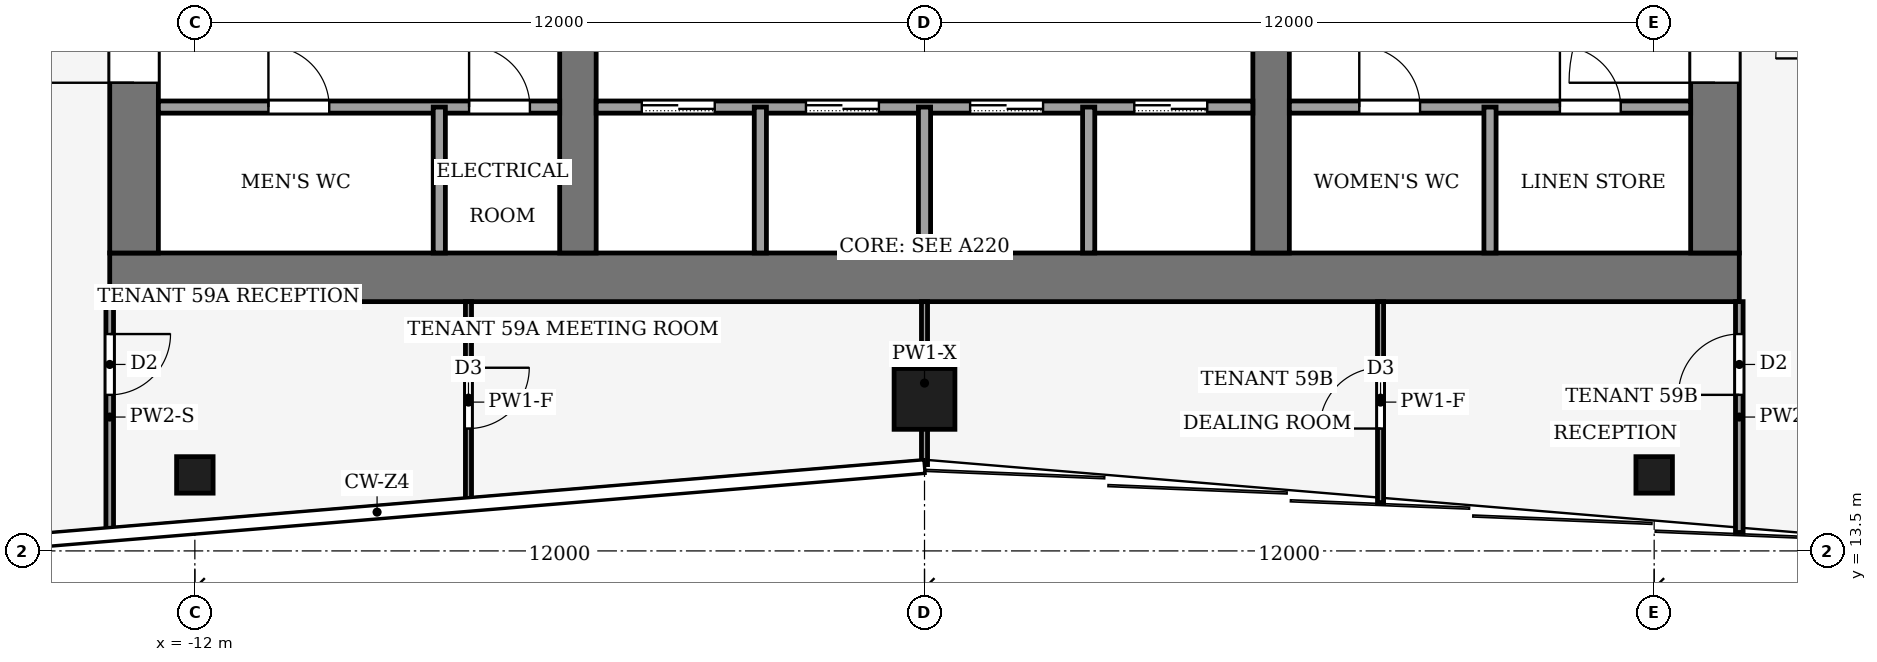
"""IFC4 building model, lengths in metres.
Left out: names, types, materials, properties, quantities, classifications, styles, units other than length and angle.
Written with IfcOpenShell. Run it as: python <this file> out.ifc"""

import sys

from ifc_helpers import new_model, si_unit, direction, frame, frame_2d, origin, origin_2d, place, context, subcontext, project, spatial, rectangle, hollow_rectangle, extrude, element, fill, save


model = new_model("IFC4")
c1 = context("Model", 3, precision=1e-05, world=origin(), true_north=direction((0.0, 1.0)))
c2 = subcontext(c1, "Body", "Model", "MODEL_VIEW")
j1 = project(units=[si_unit("LENGTHUNIT", "METRE"), si_unit("PLANEANGLEUNIT", "RADIAN")], contexts=[c1])
p1 = place(None, origin())
s1 = spatial("IfcSite", under=j1, at=p1, CompositionType="ELEMENT")
p2 = place(p1, origin())
s2 = spatial("IfcBuilding", under=s1, at=p2, CompositionType="ELEMENT")
p3 = place(p2, frame((0.0, 0.0, 258.0)))
s3 = spatial("IfcBuildingStorey", under=s2, at=p3, CompositionType="ELEMENT", Elevation=258.0)
p4 = place(p3, frame((-13.4, 18.0, -0.13), z_axis=(0.0, 0.0, 1.0), x_axis=(1.0, 0.0, 0.0)))
e1 = element("IfcWall", 1, at=p4, inside=s3, PredefinedType="SHEAR", context=c2, shape_type="SweptSolid", body=[
    extrude(rectangle(XDim=26.8, YDim=0.8, at=frame_2d((13.4, 0.0))), origin(), (0.0, 0.0, 1.0), 4.0),
])
p5 = place(p3, frame((-13.0, 18.4, -0.13), z_axis=(0.0, 0.0, 1.0), x_axis=(0.0, 1.0, 0.0)))
e2 = element("IfcWall", 2, at=p5, inside=s3, PredefinedType="SHEAR", context=c2, shape_type="SweptSolid", body=[
    extrude(rectangle(XDim=19.2, YDim=0.8, at=frame_2d((9.6, 0.0))), origin(), (0.0, 0.0, 1.0), 4.0),
])
p6 = place(p5, frame((2.8, 0.0, 0.13)))
e3 = element("IfcOpeningElement", 3, at=p6, cuts=e2, PredefinedType="OPENING", context=c2, shape_type="SweptSolid", body=[
    extrude(rectangle(XDim=2.4, YDim=2.4, at=frame_2d((1.2, 1.2))), frame((0.0, 0.41, 0.0), z_axis=(0.0, -1.0, 0.0), x_axis=(1.0, 0.0, 0.0)), (0.0, 0.0, 1.0), 0.82),
])
p7 = place(p5, frame((13.4, 0.0, 0.13)))
e4 = element("IfcOpeningElement", 4, at=p7, cuts=e2, PredefinedType="OPENING", context=c2, shape_type="SweptSolid", body=[
    extrude(rectangle(XDim=1.4, YDim=2.2, at=frame_2d((0.7, 1.1))), frame((0.0, 0.41, 0.0), z_axis=(0.0, -1.0, 0.0), x_axis=(1.0, 0.0, 0.0)), (0.0, 0.0, 1.0), 0.82),
])
p8 = place(p3, frame((13.0, 18.4, -0.13), z_axis=(0.0, 0.0, 1.0), x_axis=(0.0, 1.0, 0.0)))
e5 = element("IfcWall", 5, at=p8, inside=s3, PredefinedType="SHEAR", context=c2, shape_type="SweptSolid", body=[
    extrude(rectangle(XDim=19.2, YDim=0.8, at=frame_2d((9.6, 0.0))), origin(), (0.0, 0.0, 1.0), 4.0),
])
p9 = place(p8, frame((2.8, 0.0, 0.13)))
e6 = element("IfcOpeningElement", 6, at=p9, cuts=e5, PredefinedType="OPENING", context=c2, shape_type="SweptSolid", body=[
    extrude(rectangle(XDim=2.4, YDim=2.4, at=frame_2d((1.2, 1.2))), frame((0.0, 0.41, 0.0), z_axis=(0.0, -1.0, 0.0), x_axis=(1.0, 0.0, 0.0)), (0.0, 0.0, 1.0), 0.82),
])
p10 = place(p8, frame((13.3, 0.0, 0.13)))
e7 = element("IfcOpeningElement", 7, at=p10, cuts=e5, PredefinedType="OPENING", context=c2, shape_type="SweptSolid", body=[
    extrude(rectangle(XDim=2.4, YDim=2.4, at=frame_2d((1.2, 1.2))), frame((0.0, 0.41, 0.0), z_axis=(0.0, -1.0, 0.0), x_axis=(1.0, 0.0, 0.0)), (0.0, 0.0, 1.0), 0.82),
])
p11 = place(p3, frame((-5.7, 18.4, -0.13), z_axis=(0.0, 0.0, 1.0), x_axis=(0.0, 1.0, 0.0)))
e8 = element("IfcWall", 8, at=p11, inside=s3, PredefinedType="SHEAR", context=c2, shape_type="SweptSolid", body=[
    extrude(rectangle(XDim=19.2, YDim=0.6, at=frame_2d((9.6, 0.0))), origin(), (0.0, 0.0, 1.0), 4.0),
])
p12 = place(p11, frame((8.35, 0.0, 0.13)))
e9 = element("IfcOpeningElement", 9, at=p12, cuts=e8, PredefinedType="OPENING", context=c2, shape_type="SweptSolid", body=[
    extrude(rectangle(XDim=0.9, YDim=2.1, at=frame_2d((0.45, 1.05))), frame((0.0, 0.31, 0.0), z_axis=(0.0, -1.0, 0.0), x_axis=(1.0, 0.0, 0.0)), (0.0, 0.0, 1.0), 0.62),
])
p13 = place(p3, frame((5.7, 18.4, -0.13), z_axis=(0.0, 0.0, 1.0), x_axis=(0.0, 1.0, 0.0)))
e10 = element("IfcWall", 10, at=p13, inside=s3, PredefinedType="SHEAR", context=c2, shape_type="SweptSolid", body=[
    extrude(rectangle(XDim=19.2, YDim=0.6, at=frame_2d((9.6, 0.0))), origin(), (0.0, 0.0, 1.0), 4.0),
])
p14 = place(p13, frame((8.35, 0.0, 0.13)))
e11 = element("IfcOpeningElement", 11, at=p14, cuts=e10, PredefinedType="OPENING", context=c2, shape_type="SweptSolid", body=[
    extrude(rectangle(XDim=0.9, YDim=2.1, at=frame_2d((0.45, 1.05))), frame((0.0, 0.31, 0.0), z_axis=(0.0, -1.0, 0.0), x_axis=(1.0, 0.0, 0.0)), (0.0, 0.0, 1.0), 0.62),
])
p15 = place(p13, frame((13.3, 0.0, 0.13)))
e12 = element("IfcOpeningElement", 12, at=p15, cuts=e10, PredefinedType="OPENING", context=c2, shape_type="SweptSolid", body=[
    extrude(rectangle(XDim=2.4, YDim=2.4, at=frame_2d((1.2, 1.2))), frame((0.0, 0.31, 0.0), z_axis=(0.0, -1.0, 0.0), x_axis=(1.0, 0.0, 0.0)), (0.0, 0.0, 1.0), 0.62),
])
p16 = place(p3, frame((0.0, 16.0, 0.0), z_axis=(0.0, 0.0, 1.0), x_axis=(1.0, 0.0, 0.0)))
e13 = element("IfcColumn", 13, at=p16, inside=s3, PredefinedType="COLUMN", context=c2, shape_type="SweptSolid", body=[
    extrude(hollow_rectangle(XDim=1.0, YDim=1.0, WallThickness=0.045, at=origin_2d()), origin(), (0.0, 0.0, 1.0), 4.0),
])
for number, where, z_axis, x_axis in (
    (14, (-12.0, 14.75, 0.0), (0.0, 0.0, 1.0), (1.0, 0.0, 0.0)),
    (15, (12.0, 14.75, 0.0), (0.0, 0.0, 1.0), (1.0, 0.0, 0.0)),
):
    element("IfcColumn", number, at=place(p3, frame(where, z_axis=z_axis, x_axis=x_axis)), inside=s3, PredefinedType="COLUMN", context=c2, shape_type="SweptSolid", body=[
        extrude(hollow_rectangle(XDim=0.6, YDim=0.6, WallThickness=0.025, at=origin_2d()), origin(), (0.0, 0.0, 1.0), 4.0),
    ])
p17 = place(p3, frame((-12.6, 20.8, 0.0), z_axis=(0.0, 0.0, 1.0), x_axis=(1.0, 0.0, 0.0)))
e16 = element("IfcWall", 16, at=p17, inside=s3, PredefinedType="PARTITIONING", context=c2, shape_type="SweptSolid", body=[
    extrude(rectangle(XDim=6.6, YDim=0.2, at=frame_2d((3.3, 0.0))), origin(), (0.0, 0.0, 1.0), 3.87),
])
p18 = place(p17, frame((1.81, 0.0, 0.0)))
e17 = element("IfcOpeningElement", 17, at=p18, cuts=e16, PredefinedType="OPENING", context=c2, shape_type="SweptSolid", body=[
    extrude(rectangle(XDim=1.0, YDim=2.1, at=frame_2d((0.5, 1.05))), frame((0.0, 0.11, 0.0), z_axis=(0.0, -1.0, 0.0), x_axis=(1.0, 0.0, 0.0)), (0.0, 0.0, 1.0), 0.22),
])
p19 = place(p17, frame((5.11, 0.0, 0.0)))
e18 = element("IfcOpeningElement", 18, at=p19, cuts=e16, PredefinedType="OPENING", context=c2, shape_type="SweptSolid", body=[
    extrude(rectangle(XDim=1.0, YDim=2.1, at=frame_2d((0.5, 1.05))), frame((0.0, 0.11, 0.0), z_axis=(0.0, -1.0, 0.0), x_axis=(1.0, 0.0, 0.0)), (0.0, 0.0, 1.0), 0.22),
])
p20 = place(p3, frame((-5.4, 20.8, 0.0), z_axis=(0.0, 0.0, 1.0), x_axis=(1.0, 0.0, 0.0)))
e19 = element("IfcWall", 19, at=p20, inside=s3, PredefinedType="PARTITIONING", context=c2, shape_type="SweptSolid", body=[
    extrude(rectangle(XDim=10.8, YDim=0.2, at=frame_2d((5.4, 0.0))), origin(), (0.0, 0.0, 1.0), 3.87),
])
p21 = place(p20, frame((0.75, 0.0, 0.0)))
e20 = element("IfcOpeningElement", 20, at=p21, cuts=e19, PredefinedType="OPENING", context=c2, shape_type="SweptSolid", body=[
    extrude(rectangle(XDim=1.2, YDim=2.2, at=frame_2d((0.6, 1.1))), frame((0.0, 0.11, 0.0), z_axis=(0.0, -1.0, 0.0), x_axis=(1.0, 0.0, 0.0)), (0.0, 0.0, 1.0), 0.22),
])
p22 = place(p20, frame((3.45, 0.0, 0.0)))
e21 = element("IfcOpeningElement", 21, at=p22, cuts=e19, PredefinedType="OPENING", context=c2, shape_type="SweptSolid", body=[
    extrude(rectangle(XDim=1.2, YDim=2.2, at=frame_2d((0.6, 1.1))), frame((0.0, 0.11, 0.0), z_axis=(0.0, -1.0, 0.0), x_axis=(1.0, 0.0, 0.0)), (0.0, 0.0, 1.0), 0.22),
])
p23 = place(p20, frame((6.15, 0.0, 0.0)))
e22 = element("IfcOpeningElement", 22, at=p23, cuts=e19, PredefinedType="OPENING", context=c2, shape_type="SweptSolid", body=[
    extrude(rectangle(XDim=1.2, YDim=2.2, at=frame_2d((0.6, 1.1))), frame((0.0, 0.11, 0.0), z_axis=(0.0, -1.0, 0.0), x_axis=(1.0, 0.0, 0.0)), (0.0, 0.0, 1.0), 0.22),
])
p24 = place(p20, frame((8.85, 0.0, 0.0)))
e23 = element("IfcOpeningElement", 23, at=p24, cuts=e19, PredefinedType="OPENING", context=c2, shape_type="SweptSolid", body=[
    extrude(rectangle(XDim=1.2, YDim=2.2, at=frame_2d((0.6, 1.1))), frame((0.0, 0.11, 0.0), z_axis=(0.0, -1.0, 0.0), x_axis=(1.0, 0.0, 0.0)), (0.0, 0.0, 1.0), 0.22),
])
p25 = place(p3, frame((6.0, 20.8, 0.0), z_axis=(0.0, 0.0, 1.0), x_axis=(1.0, 0.0, 0.0)))
e24 = element("IfcWall", 24, at=p25, inside=s3, PredefinedType="PARTITIONING", context=c2, shape_type="SweptSolid", body=[
    extrude(rectangle(XDim=6.6, YDim=0.2, at=frame_2d((3.3, 0.0))), origin(), (0.0, 0.0, 1.0), 3.87),
])
p26 = place(p25, frame((1.15, 0.0, 0.0)))
e25 = element("IfcOpeningElement", 25, at=p26, cuts=e24, PredefinedType="OPENING", context=c2, shape_type="SweptSolid", body=[
    extrude(rectangle(XDim=1.0, YDim=2.1, at=frame_2d((0.5, 1.05))), frame((0.0, 0.11, 0.0), z_axis=(0.0, -1.0, 0.0), x_axis=(1.0, 0.0, 0.0)), (0.0, 0.0, 1.0), 0.22),
])
p27 = place(p25, frame((4.45, 0.0, 0.0)))
e26 = element("IfcOpeningElement", 26, at=p27, cuts=e24, PredefinedType="OPENING", context=c2, shape_type="SweptSolid", body=[
    extrude(rectangle(XDim=1.0, YDim=2.1, at=frame_2d((0.5, 1.05))), frame((0.0, 0.11, 0.0), z_axis=(0.0, -1.0, 0.0), x_axis=(1.0, 0.0, 0.0)), (0.0, 0.0, 1.0), 0.22),
])
for number, where, z_axis, x_axis in (
    (27, (-7.98, 18.4, 0.0), (0.0, 0.0, 1.0), (0.0, 1.0, 0.0)),
    (28, (-2.7, 18.4, 0.0), (0.0, 0.0, 1.0), (0.0, 1.0, 0.0)),
    (29, (0.0, 18.4, 0.0), (0.0, 0.0, 1.0), (0.0, 1.0, 0.0)),
    (30, (2.7, 18.4, 0.0), (0.0, 0.0, 1.0), (0.0, 1.0, 0.0)),
    (31, (9.3, 18.4, 0.0), (0.0, 0.0, 1.0), (0.0, 1.0, 0.0)),
):
    element("IfcWall", number, at=place(p3, frame(where, z_axis=z_axis, x_axis=x_axis)), inside=s3, PredefinedType="PARTITIONING", context=c2, shape_type="SweptSolid", body=[
        extrude(rectangle(XDim=2.4, YDim=0.2, at=frame_2d((1.2, 0.0))), origin(), (0.0, 0.0, 1.0), 3.87),
    ])
p28 = place(p3, frame((-13.4, 17.6, 0.0), z_axis=(0.0, 0.0, 1.0), x_axis=(0.0, -1.0, 0.0)))
e32 = element("IfcWall", 32, at=p28, inside=s3, PredefinedType="PARTITIONING", context=c2, shape_type="SweptSolid", body=[
    extrude(rectangle(XDim=3.797, YDim=0.125, at=frame_2d((1.898, 0.0))), origin(), (0.0, 0.0, 1.0), 3.04),
])
p29 = place(p28, frame((0.533, 0.0, 0.0)))
e33 = element("IfcOpeningElement", 33, at=p29, cuts=e32, PredefinedType="OPENING", context=c2, shape_type="SweptSolid", body=[
    extrude(rectangle(XDim=1.0, YDim=2.1, at=frame_2d((0.5, 1.05))), frame((0.0, 0.073, 0.0), z_axis=(0.0, -1.0, 0.0), x_axis=(1.0, 0.0, 0.0)), (0.0, 0.0, 1.0), 0.145),
])
p30 = place(p3, frame((13.4, 13.803, 0.0), z_axis=(0.0, 0.0, 1.0), x_axis=(0.0, 1.0, 0.0)))
e34 = element("IfcWall", 34, at=p30, inside=s3, PredefinedType="PARTITIONING", context=c2, shape_type="SweptSolid", body=[
    extrude(rectangle(XDim=3.797, YDim=0.125, at=frame_2d((1.898, 0.0))), origin(), (0.0, 0.0, 1.0), 3.04),
])
p31 = place(p30, frame((2.263, 0.0, 0.0)))
e35 = element("IfcOpeningElement", 35, at=p31, cuts=e34, PredefinedType="OPENING", context=c2, shape_type="SweptSolid", body=[
    extrude(rectangle(XDim=1.0, YDim=2.1, at=frame_2d((0.5, 1.05))), frame((0.0, 0.073, 0.0), z_axis=(0.0, -1.0, 0.0), x_axis=(1.0, 0.0, 0.0)), (0.0, 0.0, 1.0), 0.145),
])
p32 = place(p3, frame((-7.5, 17.6, 0.0), z_axis=(0.0, 0.0, 1.0), x_axis=(0.0, -1.0, 0.0)))
e36 = element("IfcWall", 36, at=p32, inside=s3, PredefinedType="PARTITIONING", context=c2, shape_type="SweptSolid", body=[
    extrude(rectangle(XDim=3.305, YDim=0.1, at=frame_2d((1.653, 0.0))), origin(), (0.0, 0.0, 1.0), 3.04),
])
p33 = place(p32, frame((1.087, 0.0, 0.0)))
e37 = element("IfcOpeningElement", 37, at=p33, cuts=e36, PredefinedType="OPENING", context=c2, shape_type="SweptSolid", body=[
    extrude(rectangle(XDim=1.0, YDim=2.1, at=frame_2d((0.5, 1.05))), frame((0.0, 0.06, 0.0), z_axis=(0.0, -1.0, 0.0), x_axis=(1.0, 0.0, 0.0)), (0.0, 0.0, 1.0), 0.12),
])
p34 = place(p3, frame((0.0, 14.92, 0.0), z_axis=(0.0, 0.0, 1.0), x_axis=(0.0, 1.0, 0.0)))
e38 = element("IfcWall", 38, at=p34, inside=s3, PredefinedType="PARTITIONING", context=c2, shape_type="SweptSolid", body=[
    extrude(rectangle(XDim=2.68, YDim=0.1, at=frame_2d((1.34, 0.0))), origin(), (0.0, 0.0, 1.0), 3.54),
])
p35 = place(p3, frame((7.5, 14.295, 0.0), z_axis=(0.0, 0.0, 1.0), x_axis=(0.0, 1.0, 0.0)))
e39 = element("IfcWall", 39, at=p35, inside=s3, PredefinedType="PARTITIONING", context=c2, shape_type="SweptSolid", body=[
    extrude(rectangle(XDim=3.305, YDim=0.1, at=frame_2d((1.653, 0.0))), origin(), (0.0, 0.0, 1.0), 3.04),
])
p36 = place(p35, frame((1.218, 0.0, 0.0)))
e40 = element("IfcOpeningElement", 40, at=p36, cuts=e39, PredefinedType="OPENING", context=c2, shape_type="SweptSolid", body=[
    extrude(rectangle(XDim=1.0, YDim=2.1, at=frame_2d((0.5, 1.05))), frame((0.0, 0.06, 0.0), z_axis=(0.0, -1.0, 0.0), x_axis=(1.0, 0.0, 0.0)), (0.0, 0.0, 1.0), 0.12),
])
p37 = place(p21, origin())
e41 = element("IfcDoor", 41, at=p37, inside=s3, OperationType="SLIDING_TO_LEFT", PredefinedType="DOOR", context=c2, shape_type="SweptSolid", body=[
    extrude(rectangle(XDim=1.2, YDim=2.2, at=frame_2d((0.6, 1.1))), frame((0.0, 0.025, 0.0), z_axis=(0.0, -1.0, 0.0), x_axis=(1.0, 0.0, 0.0)), (0.0, 0.0, 1.0), 0.05),
])
fill(e20, e41)
p38 = place(p22, origin())
e42 = element("IfcDoor", 42, at=p38, inside=s3, OperationType="SLIDING_TO_LEFT", PredefinedType="DOOR", context=c2, shape_type="SweptSolid", body=[
    extrude(rectangle(XDim=1.2, YDim=2.2, at=frame_2d((0.6, 1.1))), frame((0.0, 0.025, 0.0), z_axis=(0.0, -1.0, 0.0), x_axis=(1.0, 0.0, 0.0)), (0.0, 0.0, 1.0), 0.05),
])
fill(e21, e42)
p39 = place(p23, origin())
e43 = element("IfcDoor", 43, at=p39, inside=s3, OperationType="SLIDING_TO_LEFT", PredefinedType="DOOR", context=c2, shape_type="SweptSolid", body=[
    extrude(rectangle(XDim=1.2, YDim=2.2, at=frame_2d((0.6, 1.1))), frame((0.0, 0.025, 0.0), z_axis=(0.0, -1.0, 0.0), x_axis=(1.0, 0.0, 0.0)), (0.0, 0.0, 1.0), 0.05),
])
fill(e22, e43)
p40 = place(p24, origin())
e44 = element("IfcDoor", 44, at=p40, inside=s3, OperationType="SLIDING_TO_LEFT", PredefinedType="DOOR", context=c2, shape_type="SweptSolid", body=[
    extrude(rectangle(XDim=1.2, YDim=2.2, at=frame_2d((0.6, 1.1))), frame((0.0, 0.025, 0.0), z_axis=(0.0, -1.0, 0.0), x_axis=(1.0, 0.0, 0.0)), (0.0, 0.0, 1.0), 0.05),
])
fill(e23, e44)
p41 = place(p18, origin())
e45 = element("IfcDoor", 45, at=p41, inside=s3, OperationType="SINGLE_SWING_LEFT", PredefinedType="DOOR", context=c2, shape_type="SweptSolid", body=[
    extrude(rectangle(XDim=1.0, YDim=2.1, at=frame_2d((0.5, 1.05))), frame((0.0, 0.025, 0.0), z_axis=(0.0, -1.0, 0.0), x_axis=(1.0, 0.0, 0.0)), (0.0, 0.0, 1.0), 0.05),
])
fill(e17, e45)
p42 = place(p19, origin())
e46 = element("IfcDoor", 46, at=p42, inside=s3, OperationType="SINGLE_SWING_LEFT", PredefinedType="DOOR", context=c2, shape_type="SweptSolid", body=[
    extrude(rectangle(XDim=1.0, YDim=2.1, at=frame_2d((0.5, 1.05))), frame((0.0, 0.025, 0.0), z_axis=(0.0, -1.0, 0.0), x_axis=(1.0, 0.0, 0.0)), (0.0, 0.0, 1.0), 0.05),
])
fill(e18, e46)
p43 = place(p26, origin())
e47 = element("IfcDoor", 47, at=p43, inside=s3, OperationType="SINGLE_SWING_LEFT", PredefinedType="DOOR", context=c2, shape_type="SweptSolid", body=[
    extrude(rectangle(XDim=1.0, YDim=2.1, at=frame_2d((0.5, 1.05))), frame((0.0, 0.025, 0.0), z_axis=(0.0, -1.0, 0.0), x_axis=(1.0, 0.0, 0.0)), (0.0, 0.0, 1.0), 0.05),
])
fill(e25, e47)
p44 = place(p27, origin())
e48 = element("IfcDoor", 48, at=p44, inside=s3, OperationType="SINGLE_SWING_LEFT", PredefinedType="DOOR", context=c2, shape_type="SweptSolid", body=[
    extrude(rectangle(XDim=1.0, YDim=2.1, at=frame_2d((0.5, 1.05))), frame((0.0, 0.025, 0.0), z_axis=(0.0, -1.0, 0.0), x_axis=(1.0, 0.0, 0.0)), (0.0, 0.0, 1.0), 0.05),
])
fill(e26, e48)
p45 = place(p6, origin())
e49 = element("IfcDoor", 49, at=p45, inside=s3, OperationType="DOUBLE_DOOR_SINGLE_SWING", PredefinedType="DOOR", context=c2, shape_type="SweptSolid", body=[
    extrude(rectangle(XDim=2.4, YDim=2.4, at=frame_2d((1.2, 1.2))), frame((0.0, 0.025, 0.0), z_axis=(0.0, -1.0, 0.0), x_axis=(1.0, 0.0, 0.0)), (0.0, 0.0, 1.0), 0.05),
])
fill(e3, e49)
p46 = place(p9, origin())
e50 = element("IfcDoor", 50, at=p46, inside=s3, OperationType="DOUBLE_DOOR_SINGLE_SWING", PredefinedType="DOOR", context=c2, shape_type="SweptSolid", body=[
    extrude(rectangle(XDim=2.4, YDim=2.4, at=frame_2d((1.2, 1.2))), frame((0.0, 0.025, 0.0), z_axis=(0.0, -1.0, 0.0), x_axis=(1.0, 0.0, 0.0)), (0.0, 0.0, 1.0), 0.05),
])
fill(e6, e50)
p47 = place(p29, origin())
e51 = element("IfcDoor", 51, at=p47, inside=s3, OperationType="SINGLE_SWING_LEFT", PredefinedType="DOOR", context=c2, shape_type="SweptSolid", body=[
    extrude(rectangle(XDim=1.0, YDim=2.1, at=frame_2d((0.5, 1.05))), frame((0.0, 0.025, 0.0), z_axis=(0.0, -1.0, 0.0), x_axis=(1.0, 0.0, 0.0)), (0.0, 0.0, 1.0), 0.05),
])
fill(e33, e51)
p48 = place(p31, origin())
e52 = element("IfcDoor", 52, at=p48, inside=s3, OperationType="SINGLE_SWING_RIGHT", PredefinedType="DOOR", context=c2, shape_type="SweptSolid", body=[
    extrude(rectangle(XDim=1.0, YDim=2.1, at=frame_2d((0.5, 1.05))), frame((0.0, 0.025, 0.0), z_axis=(0.0, -1.0, 0.0), x_axis=(1.0, 0.0, 0.0)), (0.0, 0.0, 1.0), 0.05),
])
fill(e35, e52)
p49 = place(p33, origin())
e53 = element("IfcDoor", 53, at=p49, inside=s3, OperationType="SINGLE_SWING_LEFT", PredefinedType="DOOR", context=c2, shape_type="SweptSolid", body=[
    extrude(rectangle(XDim=1.0, YDim=2.1, at=frame_2d((0.5, 1.05))), frame((0.0, 0.025, 0.0), z_axis=(0.0, -1.0, 0.0), x_axis=(1.0, 0.0, 0.0)), (0.0, 0.0, 1.0), 0.05),
])
fill(e37, e53)
p50 = place(p36, origin())
e54 = element("IfcDoor", 54, at=p50, inside=s3, OperationType="SINGLE_SWING_RIGHT", PredefinedType="DOOR", context=c2, shape_type="SweptSolid", body=[
    extrude(rectangle(XDim=1.0, YDim=2.1, at=frame_2d((0.5, 1.05))), frame((0.0, 0.025, 0.0), z_axis=(0.0, -1.0, 0.0), x_axis=(1.0, 0.0, 0.0)), (0.0, 0.0, 1.0), 0.05),
])
fill(e40, e54)
save(model, sys.argv[1])
